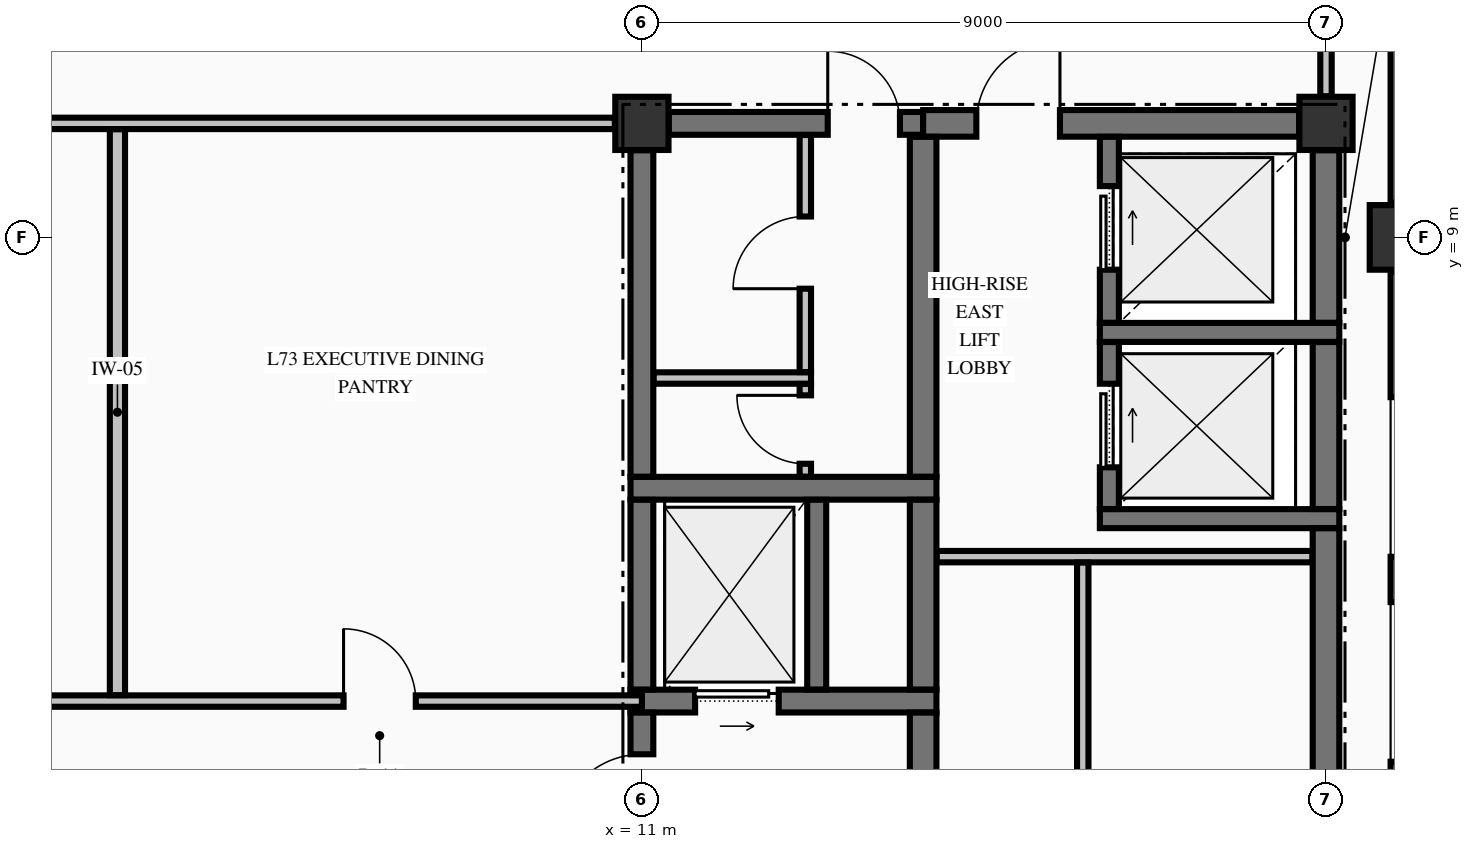
"""IFC4 building model, lengths in metres.
Left out: names, types, materials, properties, quantities, classifications, styles, units other than length and angle.
Written with IfcOpenShell. Run it as: python <this file> out.ifc"""

import sys

from ifc_helpers import new_model, si_unit, direction, frame, frame_2d, origin, origin_2d, place, context, subcontext, project, spatial, rectangle, extrude, element, fill, save


model = new_model("IFC4")
c1 = context("Model", 3, precision=1e-05, world=origin(), true_north=direction((0.0, 1.0)))
c2 = subcontext(c1, "Body", "Model", "MODEL_VIEW")
j1 = project(units=[si_unit("LENGTHUNIT", "METRE"), si_unit("PLANEANGLEUNIT", "RADIAN")], contexts=[c1])
p1 = place(None, origin())
s1 = spatial("IfcSite", under=j1, at=p1, CompositionType="ELEMENT")
p2 = place(p1, origin())
s2 = spatial("IfcBuilding", under=s1, at=p2, CompositionType="ELEMENT")
p3 = place(p2, frame((0.0, 0.0, 274.32)))
s3 = spatial("IfcBuildingStorey", under=s2, at=p3, CompositionType="ELEMENT", Elevation=274.32)
p4 = place(p3, frame((21.0, 9.0, -0.25), z_axis=(0.0, 0.0, 1.0), x_axis=(1.0, 0.0, 0.0)))
e1 = element("IfcColumn", 1, at=p4, inside=s3, PredefinedType="COLUMN", context=c2, shape_type="SweptSolid", body=[
    extrude(rectangle(XDim=0.85, YDim=0.85, at=origin_2d()), origin(), (0.0, 0.0, 1.0), 3.565),
])
for number, where, z_axis, x_axis in (
    (2, (11.0, 10.5, -0.25), (0.0, 0.0, 1.0), (1.0, 0.0, 0.0)),
    (3, (20.0, 10.5, -0.25), (0.0, 0.0, 1.0), (1.0, 0.0, 0.0)),
):
    element("IfcColumn", number, at=place(p3, frame(where, z_axis=z_axis, x_axis=x_axis)), inside=s3, PredefinedType="COLUMN", context=c2, shape_type="SweptSolid", body=[
        extrude(rectangle(XDim=0.7, YDim=0.7, at=origin_2d()), origin(), (0.0, 0.0, 1.0), 3.565),
    ])
p5 = place(p3, frame((21.0, 0.455, 0.0), z_axis=(0.0, 0.0, 1.0), x_axis=(0.0, 1.0, 0.0)))
e4 = element("IfcWall", 4, at=p5, inside=s3, PredefinedType="STANDARD", context=c2, shape_type="SweptSolid", body=[
    extrude(rectangle(XDim=8.09, YDim=0.3, at=frame_2d((4.045, 0.0))), origin(), (0.0, 0.0, 1.0), 2.707),
])
p6 = place(p5, frame((1.647, 0.0, 0.7)))
e5 = element("IfcOpeningElement", 5, at=p6, cuts=e4, PredefinedType="OPENING", context=c2, shape_type="SweptSolid", body=[
    extrude(rectangle(XDim=2.1, YDim=1.5, at=frame_2d((1.05, 0.75))), frame((0.0, 0.16, 0.0), z_axis=(0.0, -1.0, 0.0), x_axis=(1.0, 0.0, 0.0)), (0.0, 0.0, 1.0), 0.32),
])
p7 = place(p5, frame((4.343, 0.0, 0.7)))
e6 = element("IfcOpeningElement", 6, at=p7, cuts=e4, PredefinedType="OPENING", context=c2, shape_type="SweptSolid", body=[
    extrude(rectangle(XDim=2.1, YDim=1.5, at=frame_2d((1.05, 0.75))), frame((0.0, 0.16, 0.0), z_axis=(0.0, -1.0, 0.0), x_axis=(1.0, 0.0, 0.0)), (0.0, 0.0, 1.0), 0.32),
])
p8 = place(p3, frame((21.0, 9.455, 0.0), z_axis=(0.0, 0.0, 1.0), x_axis=(0.0, 1.0, 0.0)))
e7 = element("IfcWall", 7, at=p8, inside=s3, PredefinedType="STANDARD", context=c2, shape_type="SweptSolid", body=[
    extrude(rectangle(XDim=8.09, YDim=0.3, at=frame_2d((4.045, 0.0))), origin(), (0.0, 0.0, 1.0), 2.707),
])
p9 = place(p3, frame((10.85, 2.9, 0.0), z_axis=(0.0, 0.0, 1.0), x_axis=(1.0, 0.0, 0.0)))
e8 = element("IfcWall", 8, at=p9, inside=s3, PredefinedType="SHEAR", context=c2, shape_type="SweptSolid", body=[
    extrude(rectangle(XDim=4.025, YDim=0.3, at=frame_2d((2.012, 0.0))), origin(), (0.0, 0.0, 1.0), 3.315),
])
p10 = place(p9, frame((0.85, 0.0, 0.0)))
e9 = element("IfcOpeningElement", 9, at=p10, cuts=e8, PredefinedType="OPENING", context=c2, shape_type="SweptSolid", body=[
    extrude(rectangle(XDim=1.1, YDim=2.2, at=frame_2d((0.55, 1.1))), frame((0.0, 0.16, 0.0), z_axis=(0.0, -1.0, 0.0), x_axis=(1.0, 0.0, 0.0)), (0.0, 0.0, 1.0), 0.32),
])
p11 = place(p3, frame((17.025, 5.3, 0.0), z_axis=(0.0, 0.0, 1.0), x_axis=(1.0, 0.0, 0.0)))
e10 = element("IfcWall", 10, at=p11, inside=s3, PredefinedType="SOLIDWALL", context=c2, shape_type="SweptSolid", body=[
    extrude(rectangle(XDim=3.15, YDim=0.25, at=frame_2d((1.575, 0.0))), origin(), (0.0, 0.0, 1.0), 3.315),
])
p12 = place(p3, frame((10.85, 5.7, 0.0), z_axis=(0.0, 0.0, 1.0), x_axis=(1.0, 0.0, 0.0)))
e11 = element("IfcWall", 11, at=p12, inside=s3, PredefinedType="SHEAR", context=c2, shape_type="SweptSolid", body=[
    extrude(rectangle(XDim=4.025, YDim=0.3, at=frame_2d((2.012, 0.0))), origin(), (0.0, 0.0, 1.0), 3.315),
])
p13 = place(p3, frame((17.025, 7.75, 0.0), z_axis=(0.0, 0.0, 1.0), x_axis=(1.0, 0.0, 0.0)))
e12 = element("IfcWall", 12, at=p13, inside=s3, PredefinedType="SOLIDWALL", context=c2, shape_type="SweptSolid", body=[
    extrude(rectangle(XDim=3.15, YDim=0.25, at=frame_2d((1.575, 0.0))), origin(), (0.0, 0.0, 1.0), 3.315),
])
p14 = place(p3, frame((11.354, 10.5, 0.0), z_axis=(0.0, 0.0, 1.0), x_axis=(1.0, 0.0, 0.0)))
e13 = element("IfcWall", 13, at=p14, inside=s3, PredefinedType="SHEAR", context=c2, shape_type="SweptSolid", body=[
    extrude(rectangle(XDim=3.346, YDim=0.3, at=frame_2d((1.673, 0.0))), origin(), (0.0, 0.0, 1.0), 3.315),
])
p15 = place(p14, frame((2.091, 0.0, 0.0)))
e14 = element("IfcOpeningElement", 14, at=p15, cuts=e13, PredefinedType="OPENING", context=c2, shape_type="SweptSolid", body=[
    extrude(rectangle(XDim=0.95, YDim=2.15, at=frame_2d((0.475, 1.075))), frame((0.0, 0.16, 0.0), z_axis=(0.0, -1.0, 0.0), x_axis=(1.0, 0.0, 0.0)), (0.0, 0.0, 1.0), 0.32),
])
p16 = place(p3, frame((14.7, 10.5, 0.0), z_axis=(0.0, 0.0, 1.0), x_axis=(1.0, 0.0, 0.0)))
e15 = element("IfcWall", 15, at=p16, inside=s3, PredefinedType="SHEAR", context=c2, shape_type="SweptSolid", body=[
    extrude(rectangle(XDim=4.946, YDim=0.35, at=frame_2d((2.473, 0.0))), origin(), (0.0, 0.0, 1.0), 3.315),
])
p17 = place(p16, frame((0.7, 0.0, 0.0)))
e16 = element("IfcOpeningElement", 16, at=p17, cuts=e15, PredefinedType="OPENING", context=c2, shape_type="SweptSolid", body=[
    extrude(rectangle(XDim=1.1, YDim=2.15, at=frame_2d((0.55, 1.075))), frame((0.0, 0.185, 0.0), z_axis=(0.0, -1.0, 0.0), x_axis=(1.0, 0.0, 0.0)), (0.0, 0.0, 1.0), 0.37),
])
p18 = place(p3, frame((-11.0, 2.9, 0.0), z_axis=(0.0, 0.0, 1.0), x_axis=(1.0, 0.0, 0.0)))
e17 = element("IfcWall", 17, at=p18, inside=s3, PredefinedType="PARTITIONING", context=c2, shape_type="SweptSolid", body=[
    extrude(rectangle(XDim=22.0, YDim=0.15, at=frame_2d((11.0, 0.0))), origin(), (0.0, 0.0, 1.0), 3.315),
])
p19 = place(p18, frame((8.65, 0.0, 0.0)))
e18 = element("IfcOpeningElement", 18, at=p19, cuts=e17, PredefinedType="OPENING", context=c2, shape_type="SweptSolid", body=[
    extrude(rectangle(XDim=1.1, YDim=2.15, at=frame_2d((0.55, 1.075))), frame((0.0, 0.085, 0.0), z_axis=(0.0, -1.0, 0.0), x_axis=(1.0, 0.0, 0.0)), (0.0, 0.0, 1.0), 0.17),
])
p20 = place(p18, frame((3.525, 0.0, 0.0)))
e19 = element("IfcOpeningElement", 19, at=p20, cuts=e17, PredefinedType="OPENING", context=c2, shape_type="SweptSolid", body=[
    extrude(rectangle(XDim=1.05, YDim=2.15, at=frame_2d((0.525, 1.075))), frame((0.0, 0.085, 0.0), z_axis=(0.0, -1.0, 0.0), x_axis=(1.0, 0.0, 0.0)), (0.0, 0.0, 1.0), 0.17),
])
p21 = place(p18, frame((12.225, 0.0, 0.0)))
e20 = element("IfcOpeningElement", 20, at=p21, cuts=e17, PredefinedType="OPENING", context=c2, shape_type="SweptSolid", body=[
    extrude(rectangle(XDim=0.95, YDim=2.15, at=frame_2d((0.475, 1.075))), frame((0.0, 0.085, 0.0), z_axis=(0.0, -1.0, 0.0), x_axis=(1.0, 0.0, 0.0)), (0.0, 0.0, 1.0), 0.17),
])
p22 = place(p18, frame((18.075, 0.0, 0.0)))
e21 = element("IfcOpeningElement", 21, at=p22, cuts=e17, PredefinedType="OPENING", context=c2, shape_type="SweptSolid", body=[
    extrude(rectangle(XDim=0.95, YDim=2.15, at=frame_2d((0.475, 1.075))), frame((0.0, 0.085, 0.0), z_axis=(0.0, -1.0, 0.0), x_axis=(1.0, 0.0, 0.0)), (0.0, 0.0, 1.0), 0.17),
])
p23 = place(p3, frame((14.878, 4.8, 0.0), z_axis=(0.0, 0.0, 1.0), x_axis=(1.0, 0.0, 0.0)))
e22 = element("IfcWall", 22, at=p23, inside=s3, PredefinedType="PARTITIONING", context=c2, shape_type="SweptSolid", body=[
    extrude(rectangle(XDim=4.944, YDim=0.15, at=frame_2d((2.472, 0.0))), origin(), (0.0, 0.0, 1.0), 3.315),
])
p24 = place(p3, frame((11.153, 7.15, 0.0), z_axis=(0.0, 0.0, 1.0), x_axis=(1.0, 0.0, 0.0)))
e23 = element("IfcWall", 23, at=p24, inside=s3, PredefinedType="PARTITIONING", context=c2, shape_type="SweptSolid", body=[
    extrude(rectangle(XDim=2.072, YDim=0.15, at=frame_2d((1.036, 0.0))), origin(), (0.0, 0.0, 1.0), 3.315),
])
p25 = place(p3, frame((-10.644, 10.5, 0.0), z_axis=(0.0, 0.0, 1.0), x_axis=(1.0, 0.0, 0.0)))
e24 = element("IfcWall", 24, at=p25, inside=s3, PredefinedType="PARTITIONING", context=c2, shape_type="SweptSolid", body=[
    extrude(rectangle(XDim=21.288, YDim=0.15, at=frame_2d((10.644, 0.0))), origin(), (0.0, 0.0, 1.0), 3.315),
])
p26 = place(p25, frame((8.294, 0.0, 0.0)))
e25 = element("IfcOpeningElement", 25, at=p26, cuts=e24, PredefinedType="OPENING", context=c2, shape_type="SweptSolid", body=[
    extrude(rectangle(XDim=1.1, YDim=2.15, at=frame_2d((0.55, 1.075))), frame((0.0, 0.085, 0.0), z_axis=(0.0, -1.0, 0.0), x_axis=(1.0, 0.0, 0.0)), (0.0, 0.0, 1.0), 0.17),
])
p27 = place(p3, frame((11.0, 0.354, 0.0), z_axis=(0.0, 0.0, 1.0), x_axis=(0.0, 1.0, 0.0)))
e26 = element("IfcWall", 26, at=p27, inside=s3, PredefinedType="SHEAR", context=c2, shape_type="SweptSolid", body=[
    extrude(rectangle(XDim=2.394, YDim=0.3, at=frame_2d((1.197, 0.0))), origin(), (0.0, 0.0, 1.0), 3.315),
])
p28 = place(p27, frame((0.746, 0.0, 0.0)))
e27 = element("IfcOpeningElement", 27, at=p28, cuts=e26, PredefinedType="OPENING", context=c2, shape_type="SweptSolid", body=[
    extrude(rectangle(XDim=1.1, YDim=2.15, at=frame_2d((0.55, 1.075))), frame((0.0, 0.16, 0.0), z_axis=(0.0, -1.0, 0.0), x_axis=(1.0, 0.0, 0.0)), (0.0, 0.0, 1.0), 0.32),
])
p29 = place(p3, frame((11.0, 3.052, 0.0), z_axis=(0.0, 0.0, 1.0), x_axis=(0.0, 1.0, 0.0)))
e28 = element("IfcWall", 28, at=p29, inside=s3, PredefinedType="SHEAR", context=c2, shape_type="SweptSolid", body=[
    extrude(rectangle(XDim=2.496, YDim=0.3, at=frame_2d((1.248, 0.0))), origin(), (0.0, 0.0, 1.0), 3.315),
])
p30 = place(p3, frame((11.0, 5.852, 0.0), z_axis=(0.0, 0.0, 1.0), x_axis=(0.0, 1.0, 0.0)))
e29 = element("IfcWall", 29, at=p30, inside=s3, PredefinedType="SHEAR", context=c2, shape_type="SweptSolid", body=[
    extrude(rectangle(XDim=4.294, YDim=0.3, at=frame_2d((2.147, 0.0))), origin(), (0.0, 0.0, 1.0), 3.315),
])
p31 = place(p3, frame((13.3, 3.052, 0.0), z_axis=(0.0, 0.0, 1.0), x_axis=(0.0, 1.0, 0.0)))
e30 = element("IfcWall", 30, at=p31, inside=s3, PredefinedType="SOLIDWALL", context=c2, shape_type="SweptSolid", body=[
    extrude(rectangle(XDim=2.496, YDim=0.25, at=frame_2d((1.248, 0.0))), origin(), (0.0, 0.0, 1.0), 3.315),
])
p32 = place(p3, frame((14.7, -0.098, 0.0), z_axis=(0.0, 0.0, 1.0), x_axis=(0.0, 1.0, 0.0)))
e31 = element("IfcWall", 31, at=p32, inside=s3, PredefinedType="SHEAR", context=c2, shape_type="SweptSolid", body=[
    extrude(rectangle(XDim=2.846, YDim=0.35, at=frame_2d((1.423, 0.0))), origin(), (0.0, 0.0, 1.0), 3.315),
])
p33 = place(p3, frame((14.7, 3.052, 0.0), z_axis=(0.0, 0.0, 1.0), x_axis=(0.0, 1.0, 0.0)))
e32 = element("IfcWall", 32, at=p33, inside=s3, PredefinedType="SHEAR", context=c2, shape_type="SweptSolid", body=[
    extrude(rectangle(XDim=2.496, YDim=0.35, at=frame_2d((1.248, 0.0))), origin(), (0.0, 0.0, 1.0), 3.315),
])
p34 = place(p3, frame((14.7, 5.852, 0.0), z_axis=(0.0, 0.0, 1.0), x_axis=(0.0, 1.0, 0.0)))
e33 = element("IfcWall", 33, at=p34, inside=s3, PredefinedType="SHEAR", context=c2, shape_type="SweptSolid", body=[
    extrude(rectangle(XDim=4.471, YDim=0.35, at=frame_2d((2.235, 0.0))), origin(), (0.0, 0.0, 1.0), 3.315),
])
p35 = place(p3, frame((17.15, 5.427, 0.0), z_axis=(0.0, 0.0, 1.0), x_axis=(0.0, 1.0, 0.0)))
e34 = element("IfcWall", 34, at=p35, inside=s3, PredefinedType="SOLIDWALL", context=c2, shape_type="SweptSolid", body=[
    extrude(rectangle(XDim=2.196, YDim=0.25, at=frame_2d((1.098, 0.0))), origin(), (0.0, 0.0, 1.0), 3.315),
])
p36 = place(p35, frame((0.548, 0.0, 0.0)))
e35 = element("IfcOpeningElement", 35, at=p36, cuts=e34, PredefinedType="OPENING", context=c2, shape_type="SweptSolid", body=[
    extrude(rectangle(XDim=1.1, YDim=2.2, at=frame_2d((0.55, 1.1))), frame((0.0, 0.135, 0.0), z_axis=(0.0, -1.0, 0.0), x_axis=(1.0, 0.0, 0.0)), (0.0, 0.0, 1.0), 0.27),
])
p37 = place(p3, frame((17.15, 7.877, 0.0), z_axis=(0.0, 0.0, 1.0), x_axis=(0.0, 1.0, 0.0)))
e36 = element("IfcWall", 36, at=p37, inside=s3, PredefinedType="SOLIDWALL", context=c2, shape_type="SweptSolid", body=[
    extrude(rectangle(XDim=2.446, YDim=0.25, at=frame_2d((1.223, 0.0))), origin(), (0.0, 0.0, 1.0), 3.315),
])
p38 = place(p37, frame((0.698, 0.0, 0.0)))
e37 = element("IfcOpeningElement", 37, at=p38, cuts=e36, PredefinedType="OPENING", context=c2, shape_type="SweptSolid", body=[
    extrude(rectangle(XDim=1.1, YDim=2.2, at=frame_2d((0.55, 1.1))), frame((0.0, 0.135, 0.0), z_axis=(0.0, -1.0, 0.0), x_axis=(1.0, 0.0, 0.0)), (0.0, 0.0, 1.0), 0.27),
])
p39 = place(p3, frame((20.0, -9.596, 0.0), z_axis=(0.0, 0.0, 1.0), x_axis=(0.0, 1.0, 0.0)))
e38 = element("IfcWall", 38, at=p39, inside=s3, PredefinedType="SHEAR", context=c2, shape_type="SweptSolid", body=[
    extrude(rectangle(XDim=14.769, YDim=0.35, at=frame_2d((7.385, 0.0))), origin(), (0.0, 0.0, 1.0), 3.315),
])
p40 = place(p3, frame((20.0, 5.427, 0.0), z_axis=(0.0, 0.0, 1.0), x_axis=(0.0, 1.0, 0.0)))
e39 = element("IfcWall", 39, at=p40, inside=s3, PredefinedType="SHEAR", context=c2, shape_type="SweptSolid", body=[
    extrude(rectangle(XDim=2.196, YDim=0.35, at=frame_2d((1.098, 0.0))), origin(), (0.0, 0.0, 1.0), 3.315),
])
p41 = place(p3, frame((20.0, 7.877, 0.0), z_axis=(0.0, 0.0, 1.0), x_axis=(0.0, 1.0, 0.0)))
e40 = element("IfcWall", 40, at=p41, inside=s3, PredefinedType="SHEAR", context=c2, shape_type="SweptSolid", body=[
    extrude(rectangle(XDim=2.269, YDim=0.35, at=frame_2d((1.135, 0.0))), origin(), (0.0, 0.0, 1.0), 3.315),
])
p42 = place(p3, frame((4.1, 2.978, 0.0), z_axis=(0.0, 0.0, 1.0), x_axis=(0.0, 1.0, 0.0)))
e41 = element("IfcWall", 41, at=p42, inside=s3, PredefinedType="PARTITIONING", context=c2, shape_type="SweptSolid", body=[
    extrude(rectangle(XDim=7.444, YDim=0.2, at=frame_2d((3.722, 0.0))), origin(), (0.0, 0.0, 1.0), 3.315),
])
p43 = place(p3, frame((13.15, 5.853, 0.0), z_axis=(0.0, 0.0, 1.0), x_axis=(0.0, 1.0, 0.0)))
e42 = element("IfcWall", 42, at=p43, inside=s3, PredefinedType="PARTITIONING", context=c2, shape_type="SweptSolid", body=[
    extrude(rectangle(XDim=1.219, YDim=0.15, at=frame_2d((0.609, 0.0))), origin(), (0.0, 0.0, 1.0), 3.315),
])
p44 = place(p43, frame((0.169, 0.0, 0.0)))
e43 = element("IfcOpeningElement", 43, at=p44, cuts=e42, PredefinedType="OPENING", context=c2, shape_type="SweptSolid", body=[
    extrude(rectangle(XDim=0.9, YDim=2.15, at=frame_2d((0.45, 1.075))), frame((0.0, 0.085, 0.0), z_axis=(0.0, -1.0, 0.0), x_axis=(1.0, 0.0, 0.0)), (0.0, 0.0, 1.0), 0.17),
])
p45 = place(p3, frame((13.15, 7.228, 0.0), z_axis=(0.0, 0.0, 1.0), x_axis=(0.0, 1.0, 0.0)))
e44 = element("IfcWall", 44, at=p45, inside=s3, PredefinedType="PARTITIONING", context=c2, shape_type="SweptSolid", body=[
    extrude(rectangle(XDim=3.119, YDim=0.15, at=frame_2d((1.56, 0.0))), origin(), (0.0, 0.0, 1.0), 3.315),
])
p46 = place(p45, frame((1.097, 0.0, 0.0)))
e45 = element("IfcOpeningElement", 45, at=p46, cuts=e44, PredefinedType="OPENING", context=c2, shape_type="SweptSolid", body=[
    extrude(rectangle(XDim=0.95, YDim=2.15, at=frame_2d((0.475, 1.075))), frame((0.0, 0.085, 0.0), z_axis=(0.0, -1.0, 0.0), x_axis=(1.0, 0.0, 0.0)), (0.0, 0.0, 1.0), 0.17),
])
p47 = place(p3, frame((16.8, -2.422, 0.0), z_axis=(0.0, 0.0, 1.0), x_axis=(0.0, 1.0, 0.0)))
e46 = element("IfcWall", 46, at=p47, inside=s3, PredefinedType="PARTITIONING", context=c2, shape_type="SweptSolid", body=[
    extrude(rectangle(XDim=7.144, YDim=0.15, at=frame_2d((3.572, 0.0))), origin(), (0.0, 0.0, 1.0), 3.315),
])
p48 = place(p3, frame((20.0, 10.856, 0.0), z_axis=(0.0, 0.0, 1.0), x_axis=(0.0, 1.0, 0.0)))
e47 = element("IfcWall", 47, at=p48, inside=s3, PredefinedType="PARTITIONING", context=c2, shape_type="SweptSolid", body=[
    extrude(rectangle(XDim=2.016, YDim=0.15, at=frame_2d((1.008, 0.0))), origin(), (0.0, 0.0, 1.0), 2.905),
])
p49 = place(p28, origin())
e48 = element("IfcDoor", 48, at=p49, inside=s3, OperationType="SINGLE_SWING_LEFT", PredefinedType="DOOR", context=c2, shape_type="SweptSolid", body=[
    extrude(rectangle(XDim=1.1, YDim=2.15, at=frame_2d((0.55, 1.075))), frame((0.0, 0.025, 0.0), z_axis=(0.0, -1.0, 0.0), x_axis=(1.0, 0.0, 0.0)), (0.0, 0.0, 1.0), 0.05),
])
fill(e27, e48)
p50 = place(p10, origin())
e49 = element("IfcDoor", 49, at=p50, inside=s3, OperationType="SLIDING_TO_RIGHT", PredefinedType="DOOR", context=c2, shape_type="SweptSolid", body=[
    extrude(rectangle(XDim=1.1, YDim=2.2, at=frame_2d((0.55, 1.1))), frame((0.0, 0.025, 0.0), z_axis=(0.0, -1.0, 0.0), x_axis=(1.0, 0.0, 0.0)), (0.0, 0.0, 1.0), 0.05),
])
fill(e9, e49)
p51 = place(p15, origin())
e50 = element("IfcDoor", 50, at=p51, inside=s3, OperationType="SINGLE_SWING_LEFT", PredefinedType="DOOR", context=c2, shape_type="SweptSolid", body=[
    extrude(rectangle(XDim=0.95, YDim=2.15, at=frame_2d((0.475, 1.075))), frame((0.0, 0.025, 0.0), z_axis=(0.0, -1.0, 0.0), x_axis=(1.0, 0.0, 0.0)), (0.0, 0.0, 1.0), 0.05),
])
fill(e14, e50)
p52 = place(p44, origin())
e51 = element("IfcDoor", 51, at=p52, inside=s3, OperationType="SINGLE_SWING_RIGHT", PredefinedType="DOOR", context=c2, shape_type="SweptSolid", body=[
    extrude(rectangle(XDim=0.9, YDim=2.15, at=frame_2d((0.45, 1.075))), frame((0.0, 0.025, 0.0), z_axis=(0.0, -1.0, 0.0), x_axis=(1.0, 0.0, 0.0)), (0.0, 0.0, 1.0), 0.05),
])
fill(e43, e51)
p53 = place(p46, origin())
e52 = element("IfcDoor", 52, at=p53, inside=s3, OperationType="SINGLE_SWING_LEFT", PredefinedType="DOOR", context=c2, shape_type="SweptSolid", body=[
    extrude(rectangle(XDim=0.95, YDim=2.15, at=frame_2d((0.475, 1.075))), frame((0.0, 0.025, 0.0), z_axis=(0.0, -1.0, 0.0), x_axis=(1.0, 0.0, 0.0)), (0.0, 0.0, 1.0), 0.05),
])
fill(e45, e52)
p54 = place(p36, origin())
e53 = element("IfcDoor", 53, at=p54, inside=s3, OperationType="SLIDING_TO_RIGHT", PredefinedType="DOOR", context=c2, shape_type="SweptSolid", body=[
    extrude(rectangle(XDim=1.1, YDim=2.2, at=frame_2d((0.55, 1.1))), frame((0.0, 0.025, 0.0), z_axis=(0.0, -1.0, 0.0), x_axis=(1.0, 0.0, 0.0)), (0.0, 0.0, 1.0), 0.05),
])
fill(e35, e53)
p55 = place(p38, origin())
e54 = element("IfcDoor", 54, at=p55, inside=s3, OperationType="SLIDING_TO_RIGHT", PredefinedType="DOOR", context=c2, shape_type="SweptSolid", body=[
    extrude(rectangle(XDim=1.1, YDim=2.2, at=frame_2d((0.55, 1.1))), frame((0.0, 0.025, 0.0), z_axis=(0.0, -1.0, 0.0), x_axis=(1.0, 0.0, 0.0)), (0.0, 0.0, 1.0), 0.05),
])
fill(e37, e54)
p56 = place(p17, origin())
e55 = element("IfcDoor", 55, at=p56, inside=s3, OperationType="SINGLE_SWING_RIGHT", PredefinedType="DOOR", context=c2, shape_type="SweptSolid", body=[
    extrude(rectangle(XDim=1.1, YDim=2.15, at=frame_2d((0.55, 1.075))), frame((0.0, 0.025, 0.0), z_axis=(0.0, -1.0, 0.0), x_axis=(1.0, 0.0, 0.0)), (0.0, 0.0, 1.0), 0.05),
])
fill(e16, e55)
p57 = place(p22, origin())
e56 = element("IfcDoor", 56, at=p57, inside=s3, OperationType="SINGLE_SWING_LEFT", PredefinedType="DOOR", context=c2, shape_type="SweptSolid", body=[
    extrude(rectangle(XDim=0.95, YDim=2.15, at=frame_2d((0.475, 1.075))), frame((0.0, 0.025, 0.0), z_axis=(0.0, -1.0, 0.0), x_axis=(1.0, 0.0, 0.0)), (0.0, 0.0, 1.0), 0.05),
])
fill(e21, e56)
save(model, sys.argv[1])
